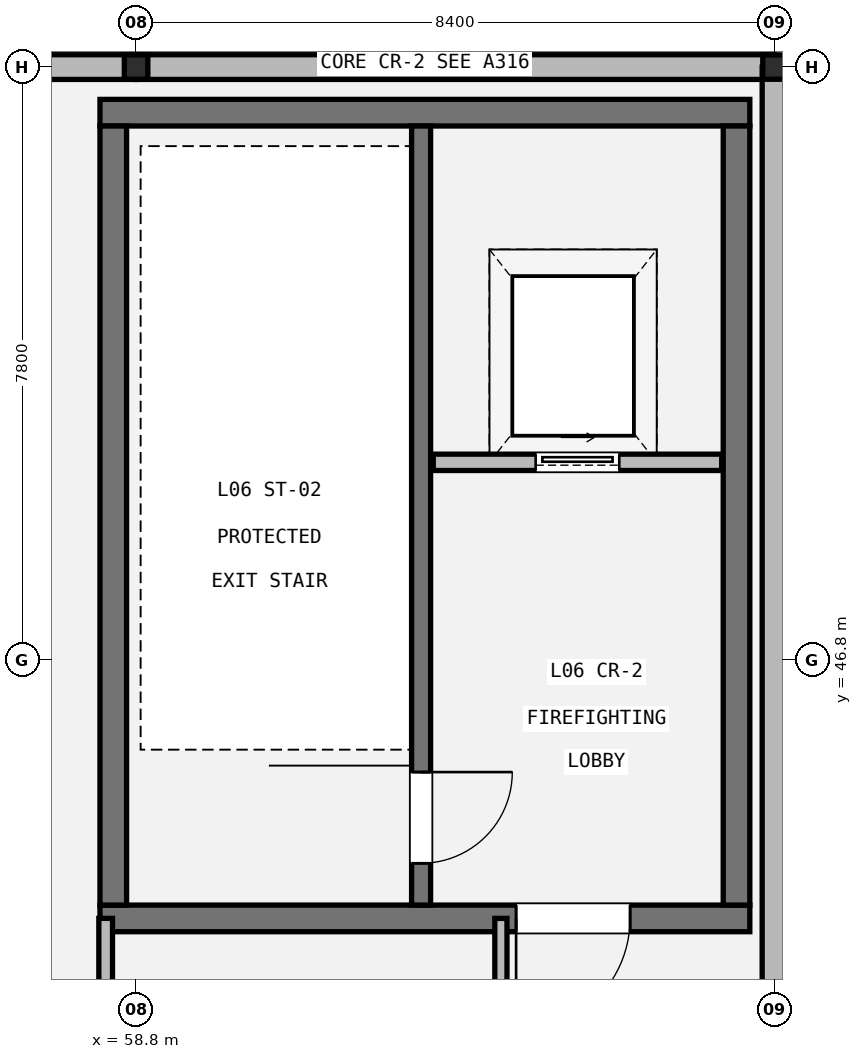
"""IFC4 building model, lengths in metres.
Left out: names, types, materials, properties, quantities, classifications, styles, units other than length and angle.
Written with IfcOpenShell. Run it as: python <this file> out.ifc"""

import sys

from ifc_helpers import new_model, si_unit, direction, frame, frame_2d, origin, origin_2d, place, context, subcontext, project, spatial, rectangle, i_section, extrude, element, fill, save


model = new_model("IFC4")
c1 = context("Model", 3, precision=1e-05, world=origin(), true_north=direction((0.0, 1.0)))
c2 = subcontext(c1, "Body", "Model", "MODEL_VIEW")
j1 = project(units=[si_unit("LENGTHUNIT", "METRE"), si_unit("PLANEANGLEUNIT", "RADIAN")], contexts=[c1])
p1 = place(None, origin())
s1 = spatial("IfcSite", under=j1, at=p1, CompositionType="ELEMENT")
p2 = place(p1, origin())
s2 = spatial("IfcBuilding", under=s1, at=p2, CompositionType="ELEMENT")
p3 = place(p2, frame((0.0, 0.0, 27.6)))
s3 = spatial("IfcBuildingStorey", under=s2, at=p3, CompositionType="ELEMENT", Elevation=27.6)
for number, where, z_axis, x_axis in (
    (1, (58.8, 54.6, 0.0), (0.0, 0.0, 1.0), (1.0, 0.0, 0.0)),
    (2, (67.2, 54.6, 0.0), (0.0, 0.0, 1.0), (1.0, 0.0, 0.0)),
):
    element("IfcColumn", number, at=place(p3, frame(where, z_axis=z_axis, x_axis=x_axis)), inside=s3, PredefinedType="COLUMN", context=c2, shape_type="SweptSolid", body=[
        extrude(i_section(OverallWidth=0.309, OverallDepth=0.321, WebThickness=0.014, FlangeThickness=0.022, FilletRadius=0.015, at=origin_2d()), origin(), (0.0, 0.0, 1.0), 4.8),
    ])
p4 = place(p3, frame((50.4, 54.6, 0.0), z_axis=(0.0, 0.0, 1.0), x_axis=(1.0, 0.0, 0.0)))
e3 = element("IfcWall", 3, at=p4, inside=s3, PredefinedType="STANDARD", context=c2, shape_type="SweptSolid", body=[
    extrude(rectangle(XDim=8.4, YDim=0.325, at=frame_2d((4.2, 0.0))), origin(), (0.0, 0.0, 1.0), 4.552),
])
p5 = place(p3, frame((58.8, 54.6, 0.0), z_axis=(0.0, 0.0, 1.0), x_axis=(1.0, 0.0, 0.0)))
e4 = element("IfcWall", 4, at=p5, inside=s3, PredefinedType="STANDARD", context=c2, shape_type="SweptSolid", body=[
    extrude(rectangle(XDim=8.4, YDim=0.325, at=frame_2d((4.2, 0.0))), origin(), (0.0, 0.0, 1.0), 4.552),
])
p6 = place(p3, frame((67.2, 54.6, 0.0), z_axis=(0.0, 0.0, 1.0), x_axis=(0.0, -1.0, 0.0)))
e5 = element("IfcWall", 5, at=p6, inside=s3, PredefinedType="STANDARD", context=c2, shape_type="SweptSolid", body=[
    extrude(rectangle(XDim=15.6, YDim=0.325, at=frame_2d((7.8, 0.0))), origin(), (0.0, 0.0, 1.0), 4.552),
])
p7 = place(p3, frame((66.875, 43.4, 0.0), z_axis=(0.0, 0.0, 1.0), x_axis=(-1.0, 0.0, 0.0)))
e6 = element("IfcWall", 6, at=p7, inside=s3, PredefinedType="SHEAR", context=c2, shape_type="SweptSolid", body=[
    extrude(rectangle(XDim=8.55, YDim=0.35, at=frame_2d((4.275, 0.0))), origin(), (0.0, 0.0, 1.0), 4.62),
])
p8 = place(p7, frame((1.575, 0.0, 0.0)))
e7 = element("IfcOpeningElement", 7, at=p8, cuts=e6, PredefinedType="OPENING", context=c2, shape_type="SweptSolid", body=[
    extrude(rectangle(XDim=1.5, YDim=2.15, at=frame_2d((0.75, 1.075))), frame((0.0, 0.185, 0.0), z_axis=(0.0, -1.0, 0.0), x_axis=(1.0, 0.0, 0.0)), (0.0, 0.0, 1.0), 0.37),
])
p9 = place(p3, frame((58.325, 54.0, 0.0), z_axis=(0.0, 0.0, 1.0), x_axis=(1.0, 0.0, 0.0)))
e8 = element("IfcWall", 8, at=p9, inside=s3, PredefinedType="SHEAR", context=c2, shape_type="SweptSolid", body=[
    extrude(rectangle(XDim=8.55, YDim=0.35, at=frame_2d((4.275, 0.0))), origin(), (0.0, 0.0, 1.0), 4.62),
])
for number, where, z_axis, x_axis in (
    (9, (58.5, 43.575, 0.0), (0.0, 0.0, 1.0), (0.0, 1.0, 0.0)),
    (10, (66.7, 53.825, 0.0), (0.0, 0.0, 1.0), (0.0, -1.0, 0.0)),
):
    element("IfcWall", number, at=place(p3, frame(where, z_axis=z_axis, x_axis=x_axis)), inside=s3, PredefinedType="SHEAR", context=c2, shape_type="SweptSolid", body=[
        extrude(rectangle(XDim=10.25, YDim=0.35, at=frame_2d((5.125, 0.0))), origin(), (0.0, 0.0, 1.0), 4.62),
    ])
p10 = place(p3, frame((62.55, 53.825, 0.0), z_axis=(0.0, 0.0, 1.0), x_axis=(0.0, -1.0, 0.0)))
e11 = element("IfcWall", 11, at=p10, inside=s3, PredefinedType="SHEAR", context=c2, shape_type="SweptSolid", body=[
    extrude(rectangle(XDim=10.25, YDim=0.25, at=frame_2d((5.125, 0.0))), origin(), (0.0, 0.0, 1.0), 4.62),
])
p11 = place(p10, frame((8.5, 0.0, 0.0)))
e12 = element("IfcOpeningElement", 12, at=p11, cuts=e11, PredefinedType="OPENING", context=c2, shape_type="SweptSolid", body=[
    extrude(rectangle(XDim=1.2, YDim=2.15, at=frame_2d((0.6, 1.075))), frame((0.0, 0.135, 0.0), z_axis=(0.0, -1.0, 0.0), x_axis=(1.0, 0.0, 0.0)), (0.0, 0.0, 1.0), 0.27),
])
p12 = place(p3, frame((62.71, 49.4, 0.0), z_axis=(0.0, 0.0, 1.0), x_axis=(1.0, 0.0, 0.0)))
e13 = element("IfcWall", 13, at=p12, inside=s3, PredefinedType="STANDARD", context=c2, shape_type="SweptSolid", body=[
    extrude(rectangle(XDim=3.795, YDim=0.215, at=frame_2d((1.897, 0.0))), origin(), (0.0, 0.0, 1.0), 4.612),
])
p13 = place(p12, frame((1.347, 0.0, 0.0)))
e14 = element("IfcOpeningElement", 14, at=p13, cuts=e13, PredefinedType="OPENING", context=c2, shape_type="SweptSolid", body=[
    extrude(rectangle(XDim=1.1, YDim=2.2, at=frame_2d((0.55, 1.1))), frame((0.0, 0.117, 0.0), z_axis=(0.0, -1.0, 0.0), x_axis=(1.0, 0.0, 0.0)), (0.0, 0.0, 1.0), 0.235),
])
p14 = place(p3, frame((58.4, 23.4, 0.0), z_axis=(0.0, 0.0, 1.0), x_axis=(0.0, 1.0, 0.0)))
e15 = element("IfcWall", 15, at=p14, inside=s3, PredefinedType="STANDARD", context=c2, shape_type="SweptSolid", body=[
    extrude(rectangle(XDim=20.0, YDim=0.18, at=frame_2d((10.0, 0.0))), origin(), (0.0, 0.0, 1.0), 4.552),
])
p15 = place(p14, frame((5.862, 0.0, 0.0)))
e16 = element("IfcOpeningElement", 16, at=p15, cuts=e15, PredefinedType="OPENING", context=c2, shape_type="SweptSolid", body=[
    extrude(rectangle(XDim=1.68, YDim=2.25, at=frame_2d((0.84, 1.125))), frame((0.0, 0.1, 0.0), z_axis=(0.0, -1.0, 0.0), x_axis=(1.0, 0.0, 0.0)), (0.0, 0.0, 1.0), 0.2),
])
p16 = place(p14, frame((17.154, 0.0, 0.0)))
e17 = element("IfcOpeningElement", 17, at=p16, cuts=e15, PredefinedType="OPENING", context=c2, shape_type="SweptSolid", body=[
    extrude(rectangle(XDim=0.94, YDim=2.1, at=frame_2d((0.47, 1.05))), frame((0.0, 0.1, 0.0), z_axis=(0.0, -1.0, 0.0), x_axis=(1.0, 0.0, 0.0)), (0.0, 0.0, 1.0), 0.2),
])
p17 = place(p3, frame((63.6, 36.2, 0.0), z_axis=(0.0, 0.0, 1.0), x_axis=(0.0, 1.0, 0.0)))
e18 = element("IfcWall", 18, at=p17, inside=s3, PredefinedType="PLUMBINGWALL", context=c2, shape_type="SweptSolid", body=[
    extrude(rectangle(XDim=7.2, YDim=0.16, at=frame_2d((3.6, 0.0))), origin(), (0.0, 0.0, 1.0), 4.552),
])
p18 = place(p17, frame((3.125, 0.0, 0.0)))
e19 = element("IfcOpeningElement", 19, at=p18, cuts=e18, PredefinedType="OPENING", context=c2, shape_type="SweptSolid", body=[
    extrude(rectangle(XDim=0.95, YDim=2.1, at=frame_2d((0.475, 1.05))), frame((0.0, 0.09, 0.0), z_axis=(0.0, -1.0, 0.0), x_axis=(1.0, 0.0, 0.0)), (0.0, 0.0, 1.0), 0.18),
])
p19 = place(p11, origin())
e20 = element("IfcDoor", 20, at=p19, inside=s3, OperationType="SINGLE_SWING_LEFT", PredefinedType="DOOR", context=c2, shape_type="SweptSolid", body=[
    extrude(rectangle(XDim=1.2, YDim=2.15, at=frame_2d((0.6, 1.075))), frame((0.0, 0.025, 0.0), z_axis=(0.0, -1.0, 0.0), x_axis=(1.0, 0.0, 0.0)), (0.0, 0.0, 1.0), 0.05),
])
fill(e12, e20)
p20 = place(p8, origin())
e21 = element("IfcDoor", 21, at=p20, inside=s3, OperationType="SINGLE_SWING_RIGHT", PredefinedType="DOOR", context=c2, shape_type="SweptSolid", body=[
    extrude(rectangle(XDim=1.5, YDim=2.15, at=frame_2d((0.75, 1.075))), frame((0.0, 0.025, 0.0), z_axis=(0.0, -1.0, 0.0), x_axis=(1.0, 0.0, 0.0)), (0.0, 0.0, 1.0), 0.05),
])
fill(e7, e21)
p21 = place(p13, origin())
e22 = element("IfcDoor", 22, at=p21, inside=s3, OperationType="SLIDING_TO_RIGHT", PredefinedType="DOOR", context=c2, shape_type="SweptSolid", body=[
    extrude(rectangle(XDim=1.1, YDim=2.2, at=frame_2d((0.55, 1.1))), frame((0.0, 0.025, 0.0), z_axis=(0.0, -1.0, 0.0), x_axis=(1.0, 0.0, 0.0)), (0.0, 0.0, 1.0), 0.05),
])
fill(e14, e22)
save(model, sys.argv[1])
